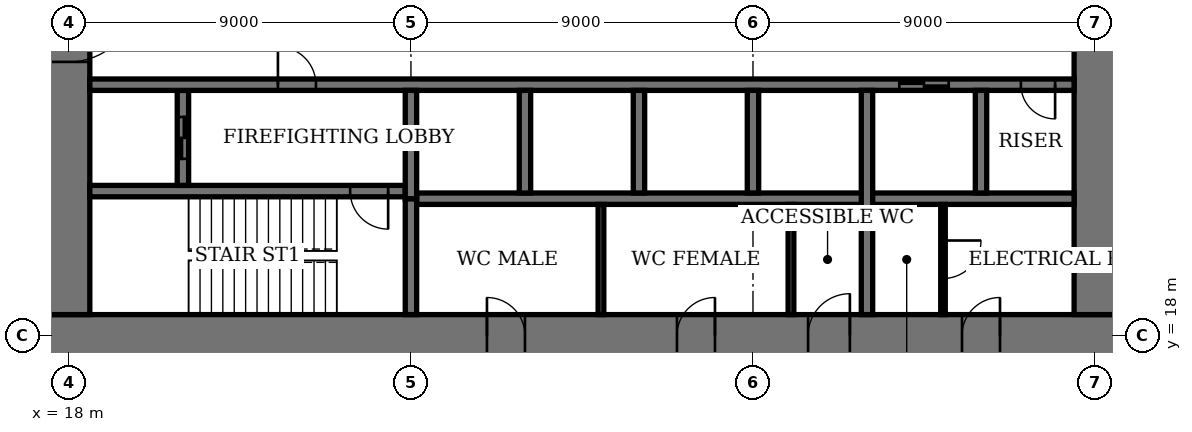
"""IFC4 building model, lengths in metres.
Left out: names, types, materials, properties, quantities, classifications, styles, units other than length and angle.
Written with IfcOpenShell. Run it as: python <this file> out.ifc"""

import sys

from ifc_helpers import new_model, si_unit, direction, frame, frame_2d, origin, place, context, subcontext, project, spatial, rectangle, extrude, element, fill, save


model = new_model("IFC4")
c1 = context("Model", 3, precision=1e-05, world=origin(), true_north=direction((0.0, 1.0)))
c2 = subcontext(c1, "Body", "Model", "MODEL_VIEW")
j1 = project(units=[si_unit("LENGTHUNIT", "METRE"), si_unit("PLANEANGLEUNIT", "RADIAN")], contexts=[c1])
p1 = place(None, origin())
s1 = spatial("IfcSite", under=j1, at=p1, CompositionType="ELEMENT")
p2 = place(p1, origin())
s2 = spatial("IfcBuilding", under=s1, at=p2, CompositionType="ELEMENT")
p3 = place(p2, frame((0.0, 0.0, 129.0)))
s3 = spatial("IfcBuildingStorey", under=s2, at=p3, CompositionType="ELEMENT", Elevation=129.0)
p4 = place(p3, frame((17.45, 18.0, 0.0), z_axis=(0.0, 0.0, 1.0), x_axis=(1.0, 0.0, 0.0)))
e1 = element("IfcWall", 1, at=p4, inside=s3, PredefinedType="SHEAR", context=c2, shape_type="SweptSolid", body=[
    extrude(rectangle(XDim=28.1, YDim=1.1, at=frame_2d((14.05, 0.0))), origin(), (0.0, 0.0, 1.0), 4.0),
])
p5 = place(p4, frame((11.55, 0.0, 0.0)))
e2 = element("IfcOpeningElement", 2, at=p5, cuts=e1, PredefinedType="OPENING", context=c2, shape_type="SweptSolid", body=[
    extrude(rectangle(XDim=1.0, YDim=2.4, at=frame_2d((0.5, 1.2))), frame((0.0, 0.56, 0.0), z_axis=(0.0, -1.0, 0.0), x_axis=(1.0, 0.0, 0.0)), (0.0, 0.0, 1.0), 1.12),
])
p6 = place(p4, frame((16.55, 0.0, 0.0)))
e3 = element("IfcOpeningElement", 3, at=p6, cuts=e1, PredefinedType="OPENING", context=c2, shape_type="SweptSolid", body=[
    extrude(rectangle(XDim=1.0, YDim=2.4, at=frame_2d((0.5, 1.2))), frame((0.0, 0.56, 0.0), z_axis=(0.0, -1.0, 0.0), x_axis=(1.0, 0.0, 0.0)), (0.0, 0.0, 1.0), 1.12),
])
p7 = place(p4, frame((20.0, 0.0, 0.0)))
e4 = element("IfcOpeningElement", 4, at=p7, cuts=e1, PredefinedType="OPENING", context=c2, shape_type="SweptSolid", body=[
    extrude(rectangle(XDim=1.1, YDim=2.4, at=frame_2d((0.55, 1.2))), frame((0.0, 0.56, 0.0), z_axis=(0.0, -1.0, 0.0), x_axis=(1.0, 0.0, 0.0)), (0.0, 0.0, 1.0), 1.12),
])
p8 = place(p4, frame((24.05, 0.0, 0.0)))
e5 = element("IfcOpeningElement", 5, at=p8, cuts=e1, PredefinedType="OPENING", context=c2, shape_type="SweptSolid", body=[
    extrude(rectangle(XDim=1.0, YDim=2.4, at=frame_2d((0.5, 1.2))), frame((0.0, 0.56, 0.0), z_axis=(0.0, -1.0, 0.0), x_axis=(1.0, 0.0, 0.0)), (0.0, 0.0, 1.0), 1.12),
])
p9 = place(p3, frame((18.0, 35.45, 0.0), z_axis=(0.0, 0.0, 1.0), x_axis=(0.0, -1.0, 0.0)))
e6 = element("IfcWall", 6, at=p9, inside=s3, PredefinedType="SHEAR", context=c2, shape_type="SweptSolid", body=[
    extrude(rectangle(XDim=16.9, YDim=1.1, at=frame_2d((8.45, 0.0))), origin(), (0.0, 0.0, 1.0), 4.0),
])
p10 = place(p9, frame((8.45, 0.0, 0.0)))
e7 = element("IfcOpeningElement", 7, at=p10, cuts=e6, PredefinedType="OPENING", context=c2, shape_type="SweptSolid", body=[
    extrude(rectangle(XDim=1.8, YDim=2.4, at=frame_2d((0.9, 1.2))), frame((0.0, 0.56, 0.0), z_axis=(0.0, -1.0, 0.0), x_axis=(1.0, 0.0, 0.0)), (0.0, 0.0, 1.0), 1.12),
])
p11 = place(p3, frame((45.0, 18.55, 0.0), z_axis=(0.0, 0.0, 1.0), x_axis=(0.0, 1.0, 0.0)))
e8 = element("IfcWall", 8, at=p11, inside=s3, PredefinedType="SHEAR", context=c2, shape_type="SweptSolid", body=[
    extrude(rectangle(XDim=16.9, YDim=1.1, at=frame_2d((8.45, 0.0))), origin(), (0.0, 0.0, 1.0), 4.0),
])
p12 = place(p11, frame((8.45, 0.0, 0.0)))
e9 = element("IfcOpeningElement", 9, at=p12, cuts=e8, PredefinedType="OPENING", context=c2, shape_type="SweptSolid", body=[
    extrude(rectangle(XDim=1.8, YDim=2.4, at=frame_2d((0.9, 1.2))), frame((0.0, 0.56, 0.0), z_axis=(0.0, -1.0, 0.0), x_axis=(1.0, 0.0, 0.0)), (0.0, 0.0, 1.0), 1.12),
])
p13 = place(p3, frame((18.55, 21.8, 0.0), z_axis=(0.0, 0.0, 1.0), x_axis=(1.0, 0.0, 0.0)))
e10 = element("IfcWall", 10, at=p13, inside=s3, PredefinedType="SHEAR", context=c2, shape_type="SweptSolid", body=[
    extrude(rectangle(XDim=8.3, YDim=0.3, at=frame_2d((4.15, 0.0))), origin(), (0.0, 0.0, 1.0), 4.0),
])
p14 = place(p13, frame((6.85, 0.0, 0.0)))
e11 = element("IfcOpeningElement", 11, at=p14, cuts=e10, PredefinedType="OPENING", context=c2, shape_type="SweptSolid", body=[
    extrude(rectangle(XDim=1.0, YDim=2.4, at=frame_2d((0.5, 1.2))), frame((0.0, 0.16, 0.0), z_axis=(0.0, -1.0, 0.0), x_axis=(1.0, 0.0, 0.0)), (0.0, 0.0, 1.0), 0.32),
])
p15 = place(p3, frame((27.0, 18.55, 0.0), z_axis=(0.0, 0.0, 1.0), x_axis=(0.0, 1.0, 0.0)))
e12 = element("IfcWall", 12, at=p15, inside=s3, PredefinedType="SHEAR", context=c2, shape_type="SweptSolid", body=[
    extrude(rectangle(XDim=3.05, YDim=0.3, at=frame_2d((1.525, 0.0))), origin(), (0.0, 0.0, 1.0), 4.0),
])
p16 = place(p3, frame((21.0, 21.95, 0.0), z_axis=(0.0, 0.0, 1.0), x_axis=(0.0, 1.0, 0.0)))
e13 = element("IfcWall", 13, at=p16, inside=s3, PredefinedType="SHEAR", context=c2, shape_type="SweptSolid", body=[
    extrude(rectangle(XDim=2.5, YDim=0.3, at=frame_2d((1.25, 0.0))), origin(), (0.0, 0.0, 1.0), 4.0),
])
p17 = place(p16, frame((0.7, 0.0, 0.0)))
e14 = element("IfcOpeningElement", 14, at=p17, cuts=e13, PredefinedType="OPENING", context=c2, shape_type="SweptSolid", body=[
    extrude(rectangle(XDim=1.1, YDim=2.4, at=frame_2d((0.55, 1.2))), frame((0.0, 0.16, 0.0), z_axis=(0.0, -1.0, 0.0), x_axis=(1.0, 0.0, 0.0)), (0.0, 0.0, 1.0), 0.32),
])
p18 = place(p3, frame((18.55, 24.6, 0.0), z_axis=(0.0, 0.0, 1.0), x_axis=(1.0, 0.0, 0.0)))
e15 = element("IfcWall", 15, at=p18, inside=s3, PredefinedType="SHEAR", context=c2, shape_type="SweptSolid", body=[
    extrude(rectangle(XDim=25.9, YDim=0.3, at=frame_2d((12.95, 0.0))), origin(), (0.0, 0.0, 1.0), 4.0),
])
p19 = place(p18, frame((4.95, 0.0, 0.0)))
e16 = element("IfcOpeningElement", 16, at=p19, cuts=e15, PredefinedType="OPENING", context=c2, shape_type="SweptSolid", body=[
    extrude(rectangle(XDim=1.0, YDim=2.4, at=frame_2d((0.5, 1.2))), frame((0.0, 0.16, 0.0), z_axis=(0.0, -1.0, 0.0), x_axis=(1.0, 0.0, 0.0)), (0.0, 0.0, 1.0), 0.32),
])
p20 = place(p18, frame((24.5, 0.0, 0.0)))
e17 = element("IfcOpeningElement", 17, at=p20, cuts=e15, PredefinedType="OPENING", context=c2, shape_type="SweptSolid", body=[
    extrude(rectangle(XDim=0.9, YDim=2.1, at=frame_2d((0.45, 1.05))), frame((0.0, 0.16, 0.0), z_axis=(0.0, -1.0, 0.0), x_axis=(1.0, 0.0, 0.0)), (0.0, 0.0, 1.0), 0.32),
])
p21 = place(p18, frame((21.3, 0.0, 0.0)))
e18 = element("IfcOpeningElement", 18, at=p21, cuts=e15, PredefinedType="OPENING", context=c2, shape_type="SweptSolid", body=[
    extrude(rectangle(XDim=1.3, YDim=2.4, at=frame_2d((0.65, 1.2))), frame((0.0, 0.16, 0.0), z_axis=(0.0, -1.0, 0.0), x_axis=(1.0, 0.0, 0.0)), (0.0, 0.0, 1.0), 0.32),
])
p22 = place(p3, frame((27.15, 21.6, 0.0), z_axis=(0.0, 0.0, 1.0), x_axis=(1.0, 0.0, 0.0)))
e19 = element("IfcWall", 19, at=p22, inside=s3, PredefinedType="SHEAR", context=c2, shape_type="SweptSolid", body=[
    extrude(rectangle(XDim=17.3, YDim=0.3, at=frame_2d((8.65, 0.0))), origin(), (0.0, 0.0, 1.0), 4.0),
])
for number, where, z_axis, x_axis in (
    (20, (30.0, 21.75, 0.0), (0.0, 0.0, 1.0), (0.0, 1.0, 0.0)),
    (21, (33.0, 21.75, 0.0), (0.0, 0.0, 1.0), (0.0, 1.0, 0.0)),
    (22, (36.0, 21.75, 0.0), (0.0, 0.0, 1.0), (0.0, 1.0, 0.0)),
):
    element("IfcWall", number, at=place(p3, frame(where, z_axis=z_axis, x_axis=x_axis)), inside=s3, PredefinedType="SHEAR", context=c2, shape_type="SweptSolid", body=[
        extrude(rectangle(XDim=2.7, YDim=0.3, at=frame_2d((1.35, 0.0))), origin(), (0.0, 0.0, 1.0), 4.0),
    ])
p23 = place(p3, frame((39.0, 18.55, 0.0), z_axis=(0.0, 0.0, 1.0), x_axis=(0.0, 1.0, 0.0)))
e23 = element("IfcWall", 23, at=p23, inside=s3, PredefinedType="SHEAR", context=c2, shape_type="SweptSolid", body=[
    extrude(rectangle(XDim=5.9, YDim=0.3, at=frame_2d((2.95, 0.0))), origin(), (0.0, 0.0, 1.0), 4.0),
])
p24 = place(p3, frame((42.0, 21.75, 0.0), z_axis=(0.0, 0.0, 1.0), x_axis=(0.0, 1.0, 0.0)))
e24 = element("IfcWall", 24, at=p24, inside=s3, PredefinedType="SHEAR", context=c2, shape_type="SweptSolid", body=[
    extrude(rectangle(XDim=2.7, YDim=0.3, at=frame_2d((1.35, 0.0))), origin(), (0.0, 0.0, 1.0), 4.0),
])
p25 = place(p3, frame((27.0, 21.6, 0.0), z_axis=(0.0, 0.0, 1.0), x_axis=(0.0, 1.0, 0.0)))
e25 = element("IfcWall", 25, at=p25, inside=s3, PredefinedType="SHEAR", context=c2, shape_type="SweptSolid", body=[
    extrude(rectangle(XDim=2.85, YDim=0.3, at=frame_2d((1.425, 0.0))), origin(), (0.0, 0.0, 1.0), 4.0),
])
for number, where, z_axis, x_axis in (
    (26, (32.0, 18.55, 0.0), (0.0, 0.0, 1.0), (0.0, 1.0, 0.0)),
    (27, (37.0, 18.55, 0.0), (0.0, 0.0, 1.0), (0.0, 1.0, 0.0)),
):
    element("IfcWall", number, at=place(p3, frame(where, z_axis=z_axis, x_axis=x_axis)), inside=s3, PredefinedType="PARTITIONING", context=c2, shape_type="SweptSolid", body=[
        extrude(rectangle(XDim=2.9, YDim=0.15, at=frame_2d((1.45, 0.0))), origin(), (0.0, 0.0, 1.0), 3.75),
    ])
p26 = place(p3, frame((41.0, 18.55, 0.0), z_axis=(0.0, 0.0, 1.0), x_axis=(0.0, 1.0, 0.0)))
e28 = element("IfcWall", 28, at=p26, inside=s3, PredefinedType="PARTITIONING", context=c2, shape_type="SweptSolid", body=[
    extrude(rectangle(XDim=2.9, YDim=0.12, at=frame_2d((1.45, 0.0))), origin(), (0.0, 0.0, 1.0), 3.75),
])
p27 = place(p26, frame((0.95, 0.0, 0.0)))
e29 = element("IfcOpeningElement", 29, at=p27, cuts=e28, PredefinedType="OPENING", context=c2, shape_type="SweptSolid", body=[
    extrude(rectangle(XDim=1.0, YDim=2.4, at=frame_2d((0.5, 1.2))), frame((0.0, 0.07, 0.0), z_axis=(0.0, -1.0, 0.0), x_axis=(1.0, 0.0, 0.0)), (0.0, 0.0, 1.0), 0.14),
])
p28 = place(p10, origin())
e30 = element("IfcDoor", 30, at=p28, inside=s3, OperationType="DOUBLE_DOOR_DOUBLE_SWING", PredefinedType="DOOR", context=c2, shape_type="SweptSolid", body=[
    extrude(rectangle(XDim=1.8, YDim=2.4, at=frame_2d((0.9, 1.2))), frame((0.0, 0.03, 0.0), z_axis=(0.0, -1.0, 0.0), x_axis=(1.0, 0.0, 0.0)), (0.0, 0.0, 1.0), 0.06),
    extrude(rectangle(XDim=0.04, YDim=2.4, at=frame_2d((0.02, 1.2))), frame((0.0, 0.55, 0.0), z_axis=(0.0, -1.0, 0.0), x_axis=(1.0, 0.0, 0.0)), (0.0, 0.0, 1.0), 1.1),
    extrude(rectangle(XDim=0.04, YDim=2.4, at=frame_2d((1.78, 1.2))), frame((0.0, 0.55, 0.0), z_axis=(0.0, -1.0, 0.0), x_axis=(1.0, 0.0, 0.0)), (0.0, 0.0, 1.0), 1.1),
    extrude(rectangle(XDim=1.8, YDim=0.04, at=frame_2d((0.9, 2.38))), frame((0.0, 0.55, 0.0), z_axis=(0.0, -1.0, 0.0), x_axis=(1.0, 0.0, 0.0)), (0.0, 0.0, 1.0), 1.1),
])
fill(e7, e30)
p29 = place(p5, origin())
e31 = element("IfcDoor", 31, at=p29, inside=s3, OperationType="SINGLE_SWING_RIGHT", PredefinedType="DOOR", context=c2, shape_type="SweptSolid", body=[
    extrude(rectangle(XDim=1.0, YDim=2.4, at=frame_2d((0.5, 1.2))), frame((0.0, 0.025, 0.0), z_axis=(0.0, -1.0, 0.0), x_axis=(1.0, 0.0, 0.0)), (0.0, 0.0, 1.0), 0.05),
    extrude(rectangle(XDim=0.04, YDim=2.4, at=frame_2d((0.02, 1.2))), frame((0.0, 0.4, 0.0), z_axis=(0.0, -1.0, 0.0), x_axis=(1.0, 0.0, 0.0)), (0.0, 0.0, 1.0), 0.8),
    extrude(rectangle(XDim=0.04, YDim=2.4, at=frame_2d((0.98, 1.2))), frame((0.0, 0.4, 0.0), z_axis=(0.0, -1.0, 0.0), x_axis=(1.0, 0.0, 0.0)), (0.0, 0.0, 1.0), 0.8),
    extrude(rectangle(XDim=1.0, YDim=0.04, at=frame_2d((0.5, 2.38))), frame((0.0, 0.4, 0.0), z_axis=(0.0, -1.0, 0.0), x_axis=(1.0, 0.0, 0.0)), (0.0, 0.0, 1.0), 0.8),
])
fill(e2, e31)
p30 = place(p6, origin())
e32 = element("IfcDoor", 32, at=p30, inside=s3, OperationType="SINGLE_SWING_LEFT", PredefinedType="DOOR", context=c2, shape_type="SweptSolid", body=[
    extrude(rectangle(XDim=1.0, YDim=2.4, at=frame_2d((0.5, 1.2))), frame((0.0, 0.025, 0.0), z_axis=(0.0, -1.0, 0.0), x_axis=(1.0, 0.0, 0.0)), (0.0, 0.0, 1.0), 0.05),
    extrude(rectangle(XDim=0.04, YDim=2.4, at=frame_2d((0.02, 1.2))), frame((0.0, 0.4, 0.0), z_axis=(0.0, -1.0, 0.0), x_axis=(1.0, 0.0, 0.0)), (0.0, 0.0, 1.0), 0.8),
    extrude(rectangle(XDim=0.04, YDim=2.4, at=frame_2d((0.98, 1.2))), frame((0.0, 0.4, 0.0), z_axis=(0.0, -1.0, 0.0), x_axis=(1.0, 0.0, 0.0)), (0.0, 0.0, 1.0), 0.8),
    extrude(rectangle(XDim=1.0, YDim=0.04, at=frame_2d((0.5, 2.38))), frame((0.0, 0.4, 0.0), z_axis=(0.0, -1.0, 0.0), x_axis=(1.0, 0.0, 0.0)), (0.0, 0.0, 1.0), 0.8),
])
fill(e3, e32)
p31 = place(p7, origin())
e33 = element("IfcDoor", 33, at=p31, inside=s3, OperationType="SINGLE_SWING_LEFT", PredefinedType="DOOR", context=c2, shape_type="SweptSolid", body=[
    extrude(rectangle(XDim=1.1, YDim=2.4, at=frame_2d((0.55, 1.2))), frame((0.0, 0.025, 0.0), z_axis=(0.0, -1.0, 0.0), x_axis=(1.0, 0.0, 0.0)), (0.0, 0.0, 1.0), 0.05),
    extrude(rectangle(XDim=0.04, YDim=2.4, at=frame_2d((0.02, 1.2))), frame((0.0, 0.44, 0.0), z_axis=(0.0, -1.0, 0.0), x_axis=(1.0, 0.0, 0.0)), (0.0, 0.0, 1.0), 0.88),
    extrude(rectangle(XDim=0.04, YDim=2.4, at=frame_2d((1.08, 1.2))), frame((0.0, 0.44, 0.0), z_axis=(0.0, -1.0, 0.0), x_axis=(1.0, 0.0, 0.0)), (0.0, 0.0, 1.0), 0.88),
    extrude(rectangle(XDim=1.1, YDim=0.04, at=frame_2d((0.55, 2.38))), frame((0.0, 0.44, 0.0), z_axis=(0.0, -1.0, 0.0), x_axis=(1.0, 0.0, 0.0)), (0.0, 0.0, 1.0), 0.88),
])
fill(e4, e33)
p32 = place(p8, origin())
e34 = element("IfcDoor", 34, at=p32, inside=s3, OperationType="SINGLE_SWING_LEFT", PredefinedType="DOOR", context=c2, shape_type="SweptSolid", body=[
    extrude(rectangle(XDim=1.0, YDim=2.4, at=frame_2d((0.5, 1.2))), frame((0.0, 0.025, 0.0), z_axis=(0.0, -1.0, 0.0), x_axis=(1.0, 0.0, 0.0)), (0.0, 0.0, 1.0), 0.05),
    extrude(rectangle(XDim=0.04, YDim=2.4, at=frame_2d((0.02, 1.2))), frame((0.0, 0.4, 0.0), z_axis=(0.0, -1.0, 0.0), x_axis=(1.0, 0.0, 0.0)), (0.0, 0.0, 1.0), 0.8),
    extrude(rectangle(XDim=0.04, YDim=2.4, at=frame_2d((0.98, 1.2))), frame((0.0, 0.4, 0.0), z_axis=(0.0, -1.0, 0.0), x_axis=(1.0, 0.0, 0.0)), (0.0, 0.0, 1.0), 0.8),
    extrude(rectangle(XDim=1.0, YDim=0.04, at=frame_2d((0.5, 2.38))), frame((0.0, 0.4, 0.0), z_axis=(0.0, -1.0, 0.0), x_axis=(1.0, 0.0, 0.0)), (0.0, 0.0, 1.0), 0.8),
])
fill(e5, e34)
p33 = place(p14, origin())
e35 = element("IfcDoor", 35, at=p33, inside=s3, OperationType="SINGLE_SWING_RIGHT", PredefinedType="DOOR", context=c2, shape_type="SweptSolid", body=[
    extrude(rectangle(XDim=1.0, YDim=2.4, at=frame_2d((0.5, 1.2))), frame((0.0, 0.03, 0.0), z_axis=(0.0, -1.0, 0.0), x_axis=(1.0, 0.0, 0.0)), (0.0, 0.0, 1.0), 0.06),
])
fill(e11, e35)
p34 = place(p19, origin())
e36 = element("IfcDoor", 36, at=p34, inside=s3, OperationType="SINGLE_SWING_RIGHT", PredefinedType="DOOR", context=c2, shape_type="SweptSolid", body=[
    extrude(rectangle(XDim=1.0, YDim=2.4, at=frame_2d((0.5, 1.2))), frame((0.0, 0.03, 0.0), z_axis=(0.0, -1.0, 0.0), x_axis=(1.0, 0.0, 0.0)), (0.0, 0.0, 1.0), 0.06),
])
fill(e16, e36)
p35 = place(p20, origin())
e37 = element("IfcDoor", 37, at=p35, inside=s3, OperationType="SINGLE_SWING_RIGHT", PredefinedType="DOOR", context=c2, shape_type="SweptSolid", body=[
    extrude(rectangle(XDim=0.9, YDim=2.1, at=frame_2d((0.45, 1.05))), frame((0.0, 0.03, 0.0), z_axis=(0.0, -1.0, 0.0), x_axis=(1.0, 0.0, 0.0)), (0.0, 0.0, 1.0), 0.06),
])
fill(e17, e37)
p36 = place(p27, origin())
e38 = element("IfcDoor", 38, at=p36, inside=s3, OperationType="SINGLE_SWING_RIGHT", PredefinedType="DOOR", context=c2, shape_type="SweptSolid", body=[
    extrude(rectangle(XDim=1.0, YDim=2.4, at=frame_2d((0.5, 1.2))), frame((0.0, 0.03, 0.0), z_axis=(0.0, -1.0, 0.0), x_axis=(1.0, 0.0, 0.0)), (0.0, 0.0, 1.0), 0.06),
])
fill(e29, e38)
p37 = place(p21, origin())
e39 = element("IfcDoor", 39, at=p37, inside=s3, OperationType="DOUBLE_DOOR_SLIDING", PredefinedType="DOOR", context=c2, shape_type="SweptSolid", body=[
    extrude(rectangle(XDim=1.3, YDim=2.4, at=frame_2d((0.65, 1.2))), frame((0.0, 0.02, 0.0), z_axis=(0.0, -1.0, 0.0), x_axis=(1.0, 0.0, 0.0)), (0.0, 0.0, 1.0), 0.04),
])
fill(e18, e39)
p38 = place(p17, origin())
e40 = element("IfcDoor", 40, at=p38, inside=s3, OperationType="DOUBLE_DOOR_SLIDING", PredefinedType="DOOR", context=c2, shape_type="SweptSolid", body=[
    extrude(rectangle(XDim=1.1, YDim=2.4, at=frame_2d((0.55, 1.2))), frame((0.0, 0.03, 0.0), z_axis=(0.0, -1.0, 0.0), x_axis=(1.0, 0.0, 0.0)), (0.0, 0.0, 1.0), 0.06),
])
fill(e14, e40)
save(model, sys.argv[1])
